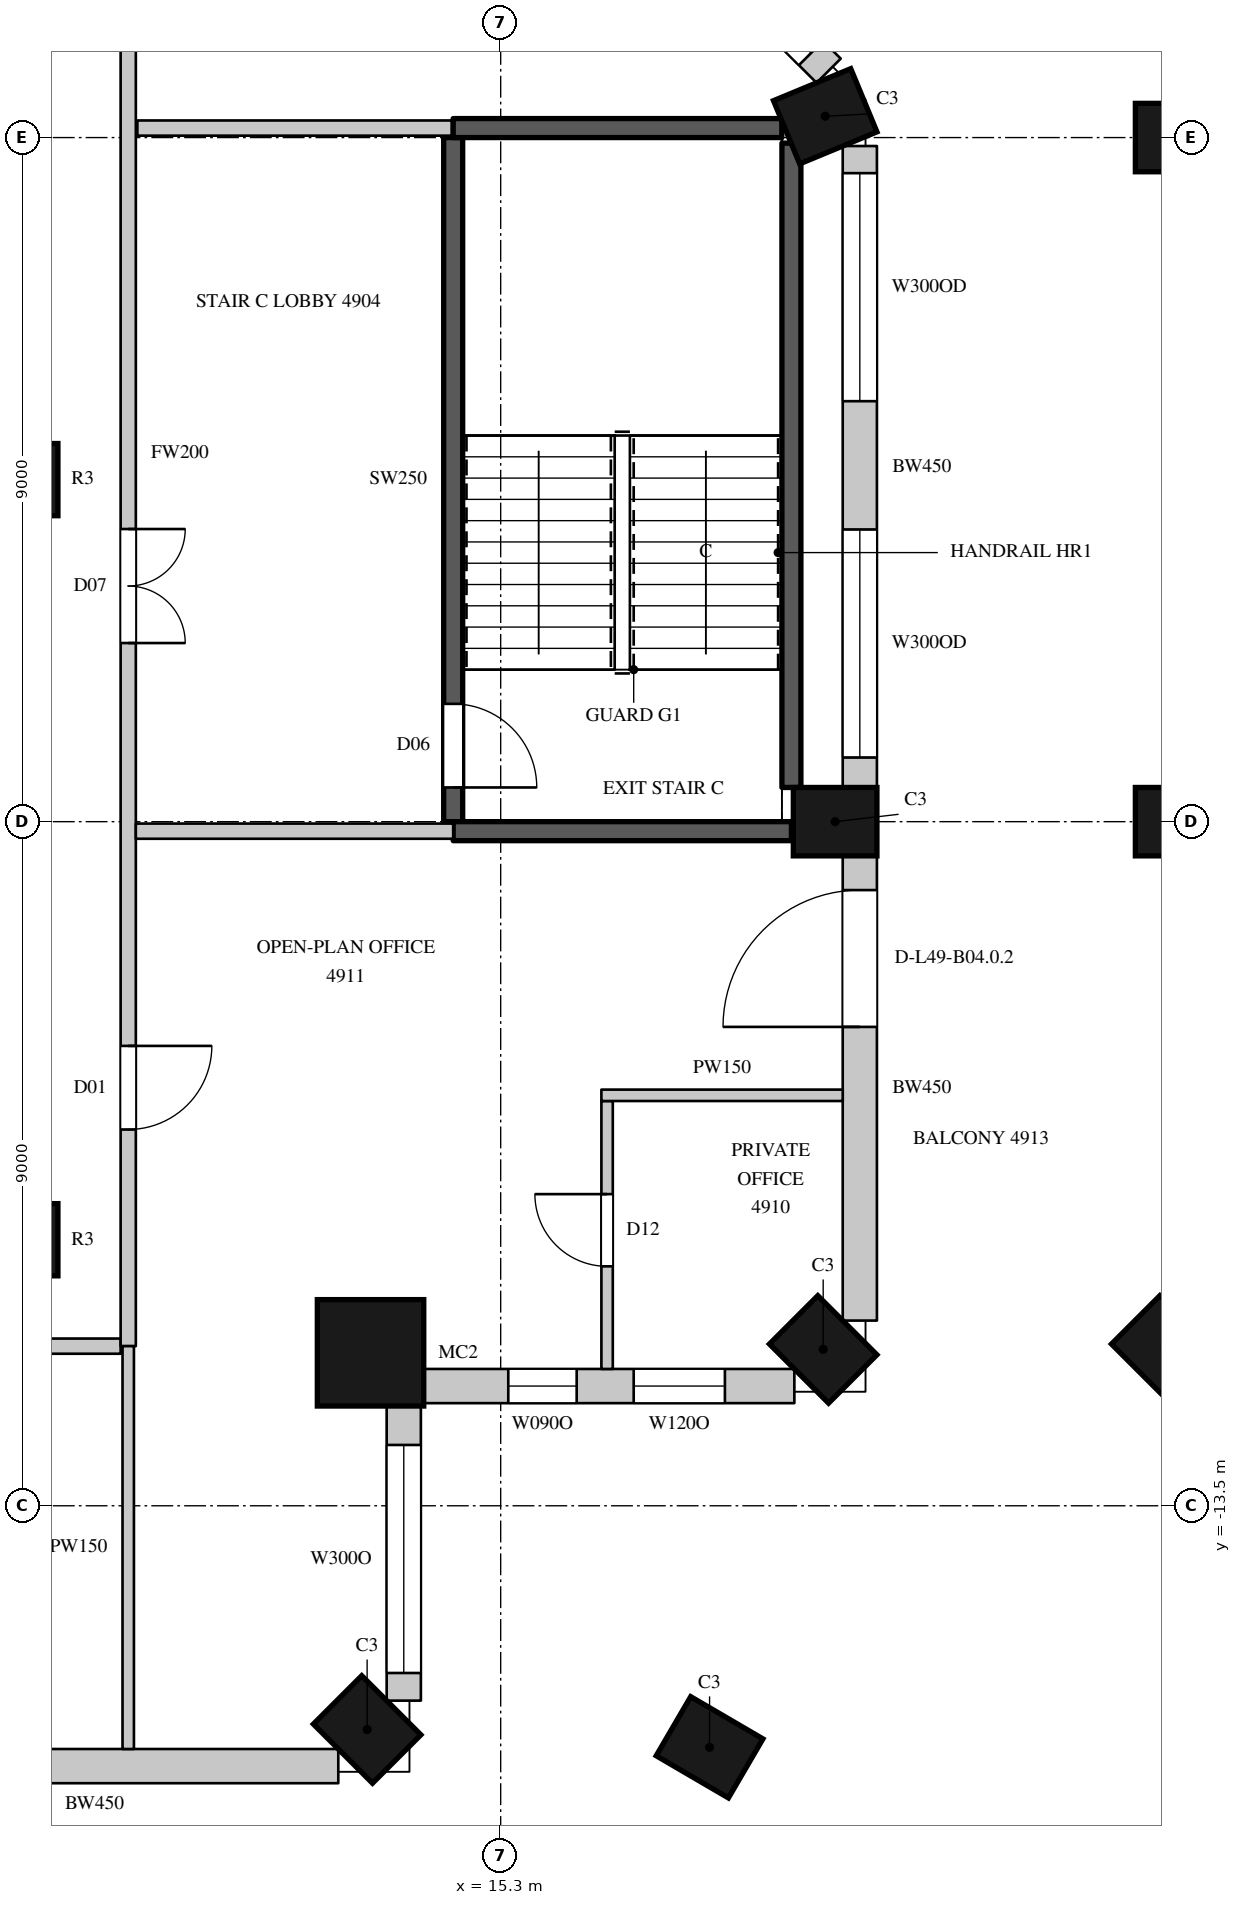
"""IFC4 building model, lengths in metres.
Left out: names, types, materials, properties, quantities, classifications, styles, units other than length and angle.
Written with IfcOpenShell. Run it as: python <this file> out.ifc"""

import sys

from ifc_helpers import new_model, si_unit, direction, frame, frame_2d, origin, origin_2d, place, context, subcontext, project, spatial, rectangle, circle, extrude, element, fill, save


model = new_model("IFC4")
c1 = context("Model", 3, precision=1e-05, world=origin(), true_north=direction((0.0, 1.0)))
c2 = subcontext(c1, "Body", "Model", "MODEL_VIEW")
j1 = project(units=[si_unit("LENGTHUNIT", "METRE"), si_unit("PLANEANGLEUNIT", "RADIAN")], contexts=[c1])
p1 = place(None, origin())
s1 = spatial("IfcSite", under=j1, at=p1, CompositionType="ELEMENT")
p2 = place(p1, origin())
s2 = spatial("IfcBuilding", under=s1, at=p2, CompositionType="ELEMENT")
p3 = place(p2, frame((0.0, 0.0, 222.0)))
s3 = spatial("IfcBuildingStorey", under=s2, at=p3, CompositionType="ELEMENT", Elevation=222.0)
p4 = place(p3, frame((13.543, -16.443, 0.0), z_axis=(0.0, 0.0, 1.0), x_axis=(0.707106781187, 0.707106781187, 0.0)))
e1 = element("IfcColumn", 1, at=p4, inside=s3, PredefinedType="COLUMN", context=c2, shape_type="SweptSolid", body=[
    extrude(rectangle(XDim=0.9, YDim=1.1, at=origin_2d()), origin(), (0.0, 0.0, 1.0), 4.1),
])
p5 = place(p3, frame((13.588, -11.488, 0.0), z_axis=(0.0, 0.0, 1.0), x_axis=(1.0, 0.0, 0.0)))
e2 = element("IfcColumn", 2, at=p5, inside=s3, PredefinedType="COLUMN", context=c2, shape_type="SweptSolid", body=[
    extrude(circle(Radius=0.7, at=origin_2d()), origin(), (0.0, 0.0, 1.0), 4.1),
])
for number, where, z_axis, x_axis in (
    (3, (19.543, -11.443, 0.0), (0.0, 0.0, 1.0), (0.707, 0.707, 0.0)),
    (4, (19.7, -4.5, 0.0), (0.0, 0.0, 1.0), (0.0, 1.0, 0.0)),
    (5, (19.57, 4.78, 0.0), (0.0, 0.0, 1.0), (-0.383, 0.924, 0.0)),
    (6, (18.048, -16.677, 0.0), (0.0, 0.0, 1.0), (0.504, 0.863, 0.0)),
    (7, (24.043, -11.443, 0.0), (0.0, 0.0, 1.0), (0.707, 0.707, 0.0)),
    (8, (24.2, -4.5, 0.0), (0.0, 0.0, 1.0), (0.0, 1.0, 0.0)),
    (9, (24.2, 4.5, 0.0), (0.0, 0.0, 1.0), (0.0, 1.0, 0.0)),
):
    element("IfcColumn", number, at=place(p3, frame(where, z_axis=z_axis, x_axis=x_axis)), inside=s3, PredefinedType="COLUMN", context=c2, shape_type="SweptSolid", body=[
        extrude(rectangle(XDim=0.9, YDim=1.1, at=origin_2d()), origin(), (0.0, 0.0, 1.0), 4.1),
    ])
for number, where, z_axis, x_axis in (
    (10, (9.0, -10.0, 0.0), (0.0, 0.0, 1.0), (1.0, 0.0, 0.0)),
    (11, (9.0, 0.0, 0.0), (0.0, 0.0, 1.0), (1.0, 0.0, 0.0)),
):
    element("IfcColumn", number, at=place(p3, frame(where, z_axis=z_axis, x_axis=x_axis)), inside=s3, PredefinedType="COLUMN", context=c2, shape_type="SweptSolid", body=[
        extrude(circle(Radius=0.475, at=origin_2d()), origin(), (0.0, 0.0, 1.0), 4.1),
    ])
p6 = place(p3, frame((6.75, -16.925, 0.0), z_axis=(0.0, 0.0, 1.0), x_axis=(1.0, 0.0, 0.0)))
e12 = element("IfcWall", 12, at=p6, inside=s3, PredefinedType="SOLIDWALL", context=c2, shape_type="SweptSolid", body=[
    extrude(rectangle(XDim=6.414, YDim=0.45, at=frame_2d((3.207, 0.0))), origin(), (0.0, 0.0, 1.0), 3.8),
])
p7 = place(p6, frame((0.525, 0.0, 0.0)))
e13 = element("IfcOpeningElement", 13, at=p7, cuts=e12, PredefinedType="OPENING", context=c2, shape_type="SweptSolid", body=[
    extrude(rectangle(XDim=1.8, YDim=2.4, at=frame_2d((0.9, 1.2))), frame((0.0, 0.235, 0.0), z_axis=(0.0, -1.0, 0.0), x_axis=(1.0, 0.0, 0.0)), (0.0, 0.0, 1.0), 0.47),
])
p8 = place(p3, frame((14.025, -16.064, 0.0), z_axis=(0.0, 0.0, 1.0), x_axis=(0.0, 1.0, 0.0)))
e14 = element("IfcWall", 14, at=p8, inside=s3, PredefinedType="SOLIDWALL", context=c2, shape_type="SweptSolid", body=[
    extrude(rectangle(XDim=3.909, YDim=0.45, at=frame_2d((1.955, 0.0))), origin(), (0.0, 0.0, 1.0), 3.8),
])
p9 = place(p8, frame((0.364, 0.0, 1.05)))
e15 = element("IfcOpeningElement", 15, at=p9, cuts=e14, PredefinedType="OPENING", context=c2, shape_type="SweptSolid", body=[
    extrude(rectangle(XDim=3.0, YDim=2.4, at=frame_2d((1.5, 1.2))), frame((0.0, 0.235, 0.0), z_axis=(0.0, -1.0, 0.0), x_axis=(1.0, 0.0, 0.0)), (0.0, 0.0, 1.0), 0.47),
])
p10 = place(p3, frame((14.255, -11.925, 0.0), z_axis=(0.0, 0.0, 1.0), x_axis=(1.0, 0.0, 0.0)))
e16 = element("IfcWall", 16, at=p10, inside=s3, PredefinedType="SOLIDWALL", context=c2, shape_type="SweptSolid", body=[
    extrude(rectangle(XDim=4.909, YDim=0.45, at=frame_2d((2.455, 0.0))), origin(), (0.0, 0.0, 1.0), 3.8),
])
p11 = place(p10, frame((1.146, 0.0, 1.05)))
e17 = element("IfcOpeningElement", 17, at=p11, cuts=e16, PredefinedType="OPENING", context=c2, shape_type="SweptSolid", body=[
    extrude(rectangle(XDim=0.9, YDim=2.4, at=frame_2d((0.45, 1.2))), frame((0.0, 0.235, 0.0), z_axis=(0.0, -1.0, 0.0), x_axis=(1.0, 0.0, 0.0)), (0.0, 0.0, 1.0), 0.47),
])
p12 = place(p10, frame((2.795, 0.0, 1.05)))
e18 = element("IfcOpeningElement", 18, at=p12, cuts=e16, PredefinedType="OPENING", context=c2, shape_type="SweptSolid", body=[
    extrude(rectangle(XDim=1.2, YDim=2.4, at=frame_2d((0.6, 1.2))), frame((0.0, 0.235, 0.0), z_axis=(0.0, -1.0, 0.0), x_axis=(1.0, 0.0, 0.0)), (0.0, 0.0, 1.0), 0.47),
])
p13 = place(p3, frame((20.025, -11.064, 0.0), z_axis=(0.0, 0.0, 1.0), x_axis=(0.0, 1.0, 0.0)))
e19 = element("IfcWall", 19, at=p13, inside=s3, PredefinedType="SOLIDWALL", context=c2, shape_type="SweptSolid", body=[
    extrude(rectangle(XDim=6.114, YDim=0.45, at=frame_2d((3.057, 0.0))), origin(), (0.0, 0.0, 1.0), 3.8),
])
p14 = place(p13, frame((3.864, 0.0, 0.0)))
e20 = element("IfcOpeningElement", 20, at=p14, cuts=e19, PredefinedType="OPENING", context=c2, shape_type="SweptSolid", body=[
    extrude(rectangle(XDim=1.8, YDim=2.4, at=frame_2d((0.9, 1.2))), frame((0.0, 0.235, 0.0), z_axis=(0.0, -1.0, 0.0), x_axis=(1.0, 0.0, 0.0)), (0.0, 0.0, 1.0), 0.47),
])
p15 = place(p3, frame((20.025, -4.05, 0.0), z_axis=(0.0, 0.0, 1.0), x_axis=(0.0, 1.0, 0.0)))
e21 = element("IfcWall", 21, at=p15, inside=s3, PredefinedType="SOLIDWALL", context=c2, shape_type="SweptSolid", body=[
    extrude(rectangle(XDim=8.439, YDim=0.45, at=frame_2d((4.219, 0.0))), origin(), (0.0, 0.0, 1.0), 3.8),
])
p16 = place(p15, frame((0.394, 0.0, 1.05)))
e22 = element("IfcOpeningElement", 22, at=p16, cuts=e21, PredefinedType="OPENING", context=c2, shape_type="SweptSolid", body=[
    extrude(rectangle(XDim=3.0, YDim=2.4, at=frame_2d((1.5, 1.2))), frame((0.0, 0.235, 0.0), z_axis=(0.0, -1.0, 0.0), x_axis=(1.0, 0.0, 0.0)), (0.0, 0.0, 1.0), 0.47),
])
p17 = place(p15, frame((5.082, 0.0, 1.05)))
e23 = element("IfcOpeningElement", 23, at=p17, cuts=e21, PredefinedType="OPENING", context=c2, shape_type="SweptSolid", body=[
    extrude(rectangle(XDim=3.0, YDim=2.4, at=frame_2d((1.5, 1.2))), frame((0.0, 0.235, 0.0), z_axis=(0.0, -1.0, 0.0), x_axis=(1.0, 0.0, 0.0)), (0.0, 0.0, 1.0), 0.47),
])
p18 = place(p3, frame((19.615, 5.379, 0.0), z_axis=(0.0, 0.0, 1.0), x_axis=(-0.707089646058, 0.7071239159, 0.0)))
e24 = element("IfcWall", 24, at=p18, inside=s3, PredefinedType="SOLIDWALL", context=c2, shape_type="SweptSolid", body=[
    extrude(rectangle(XDim=7.124, YDim=0.45, at=frame_2d((3.562, 0.0))), origin(), (0.0, 0.0, 1.0), 3.8),
])
p19 = place(p18, frame((0.328, 0.0, 1.05)))
e25 = element("IfcOpeningElement", 25, at=p19, cuts=e24, PredefinedType="OPENING", context=c2, shape_type="SweptSolid", body=[
    extrude(rectangle(XDim=2.4, YDim=2.4, at=frame_2d((1.2, 1.2))), frame((0.0, 0.235, 0.0), z_axis=(0.0, -1.0, 0.0), x_axis=(1.0, 0.0, 0.0)), (0.0, 0.0, 1.0), 0.47),
])
p20 = place(p18, frame((4.359, 0.0, 1.05)))
e26 = element("IfcOpeningElement", 26, at=p20, cuts=e24, PredefinedType="OPENING", context=c2, shape_type="SweptSolid", body=[
    extrude(rectangle(XDim=2.4, YDim=2.4, at=frame_2d((1.2, 1.2))), frame((0.0, 0.235, 0.0), z_axis=(0.0, -1.0, 0.0), x_axis=(1.0, 0.0, 0.0)), (0.0, 0.0, 1.0), 0.47),
])
p21 = place(p3, frame((-10.9, -11.4, 0.0), z_axis=(0.0, 0.0, 1.0), x_axis=(1.0, 0.0, 0.0)))
e27 = element("IfcWall", 27, at=p21, inside=s3, PredefinedType="PARTITIONING", context=c2, shape_type="SweptSolid", body=[
    extrude(rectangle(XDim=21.2, YDim=0.2, at=frame_2d((10.6, 0.0))), origin(), (0.0, 0.0, 1.0), 3.8),
])
p22 = place(p21, frame((0.95, 0.0, 0.0)))
e28 = element("IfcOpeningElement", 28, at=p22, cuts=e27, PredefinedType="OPENING", context=c2, shape_type="SweptSolid", body=[
    extrude(rectangle(XDim=0.95, YDim=2.2, at=frame_2d((0.475, 1.1))), frame((0.0, 0.11, 0.0), z_axis=(0.0, -1.0, 0.0), x_axis=(1.0, 0.0, 0.0)), (0.0, 0.0, 1.0), 0.22),
])
p23 = place(p21, frame((4.2, 0.0, 0.0)))
e29 = element("IfcOpeningElement", 29, at=p23, cuts=e27, PredefinedType="OPENING", context=c2, shape_type="SweptSolid", body=[
    extrude(rectangle(XDim=0.9, YDim=2.2, at=frame_2d((0.45, 1.1))), frame((0.0, 0.11, 0.0), z_axis=(0.0, -1.0, 0.0), x_axis=(1.0, 0.0, 0.0)), (0.0, 0.0, 1.0), 0.22),
])
p24 = place(p21, frame((8.35, 0.0, 0.0)))
e30 = element("IfcOpeningElement", 30, at=p24, cuts=e27, PredefinedType="OPENING", context=c2, shape_type="SweptSolid", body=[
    extrude(rectangle(XDim=1.1, YDim=2.4, at=frame_2d((0.55, 1.2))), frame((0.0, 0.11, 0.0), z_axis=(0.0, -1.0, 0.0), x_axis=(1.0, 0.0, 0.0)), (0.0, 0.0, 1.0), 0.22),
])
p25 = place(p21, frame((18.0, 0.0, 0.0)))
e31 = element("IfcOpeningElement", 31, at=p25, cuts=e27, PredefinedType="OPENING", context=c2, shape_type="SweptSolid", body=[
    extrude(rectangle(XDim=1.1, YDim=2.4, at=frame_2d((0.55, 1.2))), frame((0.0, 0.11, 0.0), z_axis=(0.0, -1.0, 0.0), x_axis=(1.0, 0.0, 0.0)), (0.0, 0.0, 1.0), 0.22),
])
p26 = place(p3, frame((10.4, -11.4, 0.0), z_axis=(0.0, 0.0, 1.0), x_axis=(0.0, 1.0, 0.0)))
e32 = element("IfcWall", 32, at=p26, inside=s3, PredefinedType="PARTITIONING", context=c2, shape_type="SweptSolid", body=[
    extrude(rectangle(XDim=23.5, YDim=0.2, at=frame_2d((11.75, 0.0))), origin(), (0.0, 0.0, 1.0), 3.8),
])
p27 = place(p26, frame((9.25, 0.0, 0.0)))
e33 = element("IfcOpeningElement", 33, at=p27, cuts=e32, PredefinedType="OPENING", context=c2, shape_type="SweptSolid", body=[
    extrude(rectangle(XDim=1.5, YDim=2.4, at=frame_2d((0.75, 1.2))), frame((0.0, 0.11, 0.0), z_axis=(0.0, -1.0, 0.0), x_axis=(1.0, 0.0, 0.0)), (0.0, 0.0, 1.0), 0.22),
])
p28 = place(p26, frame((2.85, 0.0, 0.0)))
e34 = element("IfcOpeningElement", 34, at=p28, cuts=e32, PredefinedType="OPENING", context=c2, shape_type="SweptSolid", body=[
    extrude(rectangle(XDim=1.1, YDim=2.4, at=frame_2d((0.55, 1.2))), frame((0.0, 0.11, 0.0), z_axis=(0.0, -1.0, 0.0), x_axis=(1.0, 0.0, 0.0)), (0.0, 0.0, 1.0), 0.22),
])
p29 = place(p3, frame((10.5, -4.625, 0.0), z_axis=(0.0, 0.0, 1.0), x_axis=(1.0, 0.0, 0.0)))
e35 = element("IfcWall", 35, at=p29, inside=s3, PredefinedType="PARTITIONING", context=c2, shape_type="SweptSolid", body=[
    extrude(rectangle(XDim=4.175, YDim=0.2, at=frame_2d((2.087, 0.0))), origin(), (0.0, 0.0, 1.0), 3.8),
])
p30 = place(p3, frame((10.52, 4.625, 0.0), z_axis=(0.0, 0.0, 1.0), x_axis=(1.0, 0.0, 0.0)))
e36 = element("IfcWall", 36, at=p30, inside=s3, PredefinedType="PARTITIONING", context=c2, shape_type="SweptSolid", body=[
    extrude(rectangle(XDim=4.135, YDim=0.2, at=frame_2d((2.067, 0.0))), origin(), (0.0, 0.0, 1.0), 3.8),
])
p31 = place(p3, frame((10.4, -16.7, 0.0), z_axis=(0.0, 0.0, 1.0), x_axis=(0.0, 1.0, 0.0)))
e37 = element("IfcWall", 37, at=p31, inside=s3, PredefinedType="PARTITIONING", context=c2, shape_type="SweptSolid", body=[
    extrude(rectangle(XDim=5.3, YDim=0.15, at=frame_2d((2.65, 0.0))), origin(), (0.0, 0.0, 1.0), 3.8),
])
p32 = place(p3, frame((16.7, -11.7, 0.0), z_axis=(0.0, 0.0, 1.0), x_axis=(0.0, 1.0, 0.0)))
e38 = element("IfcWall", 38, at=p32, inside=s3, PredefinedType="PARTITIONING", context=c2, shape_type="SweptSolid", body=[
    extrude(rectangle(XDim=3.525, YDim=0.15, at=frame_2d((1.762, 0.0))), origin(), (0.0, 0.0, 1.0), 3.8),
])
p33 = place(p32, frame((1.35, 0.0, 0.0)))
e39 = element("IfcOpeningElement", 39, at=p33, cuts=e38, PredefinedType="OPENING", context=c2, shape_type="SweptSolid", body=[
    extrude(rectangle(XDim=0.95, YDim=2.2, at=frame_2d((0.475, 1.1))), frame((0.0, 0.085, 0.0), z_axis=(0.0, -1.0, 0.0), x_axis=(1.0, 0.0, 0.0)), (0.0, 0.0, 1.0), 0.17),
])
p34 = place(p3, frame((16.625, -8.1, 0.0), z_axis=(0.0, 0.0, 1.0), x_axis=(1.0, 0.0, 0.0)))
e40 = element("IfcWall", 40, at=p34, inside=s3, PredefinedType="PARTITIONING", context=c2, shape_type="SweptSolid", body=[
    extrude(rectangle(XDim=3.175, YDim=0.15, at=frame_2d((1.587, 0.0))), origin(), (0.0, 0.0, 1.0), 3.15),
])
p35 = place(p3, frame((14.675, -4.5, 0.0), z_axis=(0.0, 0.0, 1.0), x_axis=(0.0, 1.0, 0.0)))
e41 = element("IfcWall", 41, at=p35, inside=s3, PredefinedType="SHEAR", context=c2, shape_type="SweptSolid", body=[
    extrude(rectangle(XDim=9.0, YDim=0.25, at=frame_2d((4.5, 0.0))), origin(), (0.0, 0.0, 1.0), 3.8),
])
p36 = place(p35, frame((0.45, 0.0, 0.0)))
e42 = element("IfcOpeningElement", 42, at=p36, cuts=e41, PredefinedType="OPENING", context=c2, shape_type="SweptSolid", body=[
    extrude(rectangle(XDim=1.1, YDim=2.2, at=frame_2d((0.55, 1.1))), frame((0.0, 0.135, 0.0), z_axis=(0.0, -1.0, 0.0), x_axis=(1.0, 0.0, 0.0)), (0.0, 0.0, 1.0), 0.27),
])
p37 = place(p3, frame((14.675, -4.625, 0.0), z_axis=(0.0, 0.0, 1.0), x_axis=(1.0, 0.0, 0.0)))
e43 = element("IfcWall", 43, at=p37, inside=s3, PredefinedType="SHEAR", context=c2, shape_type="SweptSolid", body=[
    extrude(rectangle(XDim=4.45, YDim=0.25, at=frame_2d((2.225, 0.0))), origin(), (0.0, 0.0, 1.0), 3.8),
])
p38 = place(p3, frame((14.675, 4.625, 0.0), z_axis=(0.0, 0.0, 1.0), x_axis=(1.0, 0.0, 0.0)))
e44 = element("IfcWall", 44, at=p38, inside=s3, PredefinedType="SHEAR", context=c2, shape_type="SweptSolid", body=[
    extrude(rectangle(XDim=4.324, YDim=0.25, at=frame_2d((2.162, 0.0))), origin(), (0.0, 0.0, 1.0), 3.8),
])
p39 = place(p3, frame((19.125, -4.05, 0.0), z_axis=(0.0, 0.0, 1.0), x_axis=(0.0, 1.0, 0.0)))
e45 = element("IfcWall", 45, at=p39, inside=s3, PredefinedType="SHEAR", context=c2, shape_type="SweptSolid", body=[
    extrude(rectangle(XDim=8.477, YDim=0.25, at=frame_2d((4.238, 0.0))), origin(), (0.0, 0.0, 1.0), 3.8),
])
p40 = place(p9, origin())
e46 = element("IfcWindow", 46, at=p40, inside=s3, PartitioningType="SINGLE_PANEL", PredefinedType="WINDOW", context=c2, shape_type="SweptSolid", body=[
    extrude(rectangle(XDim=3.0, YDim=2.4, at=frame_2d((1.5, 1.2))), frame((0.0, 0.135, 0.0), z_axis=(0.0, -1.0, 0.0), x_axis=(1.0, 0.0, 0.0)), (0.0, 0.0, 1.0), 0.06),
])
fill(e15, e46)
p41 = place(p14, origin())
e47 = element("IfcDoor", 47, at=p41, inside=s3, OperationType="SLIDING_TO_LEFT", PredefinedType="DOOR", context=c2, shape_type="SweptSolid", body=[
    extrude(rectangle(XDim=1.8, YDim=2.4, at=frame_2d((0.9, 1.2))), frame((0.0, 0.13, 0.0), z_axis=(0.0, -1.0, 0.0), x_axis=(1.0, 0.0, 0.0)), (0.0, 0.0, 1.0), 0.05),
])
fill(e20, e47)
p42 = place(p16, origin())
e48 = element("IfcWindow", 48, at=p42, inside=s3, PartitioningType="SINGLE_PANEL", PredefinedType="WINDOW", context=c2, shape_type="SweptSolid", body=[
    extrude(rectangle(XDim=3.0, YDim=2.4, at=frame_2d((1.5, 1.2))), frame((0.0, 0.135, 0.0), z_axis=(0.0, -1.0, 0.0), x_axis=(1.0, 0.0, 0.0)), (0.0, 0.0, 1.0), 0.06),
])
fill(e22, e48)
p43 = place(p17, origin())
e49 = element("IfcWindow", 49, at=p43, inside=s3, PartitioningType="SINGLE_PANEL", PredefinedType="WINDOW", context=c2, shape_type="SweptSolid", body=[
    extrude(rectangle(XDim=3.0, YDim=2.4, at=frame_2d((1.5, 1.2))), frame((0.0, 0.135, 0.0), z_axis=(0.0, -1.0, 0.0), x_axis=(1.0, 0.0, 0.0)), (0.0, 0.0, 1.0), 0.06),
])
fill(e23, e49)
p44 = place(p19, origin())
e50 = element("IfcWindow", 50, at=p44, inside=s3, PartitioningType="SINGLE_PANEL", PredefinedType="WINDOW", context=c2, shape_type="SweptSolid", body=[
    extrude(rectangle(XDim=2.4, YDim=2.4, at=frame_2d((1.2, 1.2))), frame((0.0, 0.135, 0.0), z_axis=(0.0, -1.0, 0.0), x_axis=(1.0, 0.0, 0.0)), (0.0, 0.0, 1.0), 0.06),
])
fill(e25, e50)
p45 = place(p27, origin())
e51 = element("IfcDoor", 51, at=p45, inside=s3, OperationType="DOUBLE_DOOR_SINGLE_SWING", PredefinedType="DOOR", context=c2, shape_type="SweptSolid", body=[
    extrude(rectangle(XDim=1.5, YDim=2.4, at=frame_2d((0.75, 1.2))), frame((0.0, 0.025, 0.0), z_axis=(0.0, -1.0, 0.0), x_axis=(1.0, 0.0, 0.0)), (0.0, 0.0, 1.0), 0.05),
])
fill(e33, e51)
p46 = place(p28, origin())
e52 = element("IfcDoor", 52, at=p46, inside=s3, OperationType="SINGLE_SWING_LEFT", PredefinedType="DOOR", context=c2, shape_type="SweptSolid", body=[
    extrude(rectangle(XDim=1.1, YDim=2.4, at=frame_2d((0.55, 1.2))), frame((0.0, 0.025, 0.0), z_axis=(0.0, -1.0, 0.0), x_axis=(1.0, 0.0, 0.0)), (0.0, 0.0, 1.0), 0.05),
])
fill(e34, e52)
p47 = place(p33, origin())
e53 = element("IfcDoor", 53, at=p47, inside=s3, OperationType="SINGLE_SWING_RIGHT", PredefinedType="DOOR", context=c2, shape_type="SweptSolid", body=[
    extrude(rectangle(XDim=0.95, YDim=2.2, at=frame_2d((0.475, 1.1))), frame((0.0, 0.025, 0.0), z_axis=(0.0, -1.0, 0.0), x_axis=(1.0, 0.0, 0.0)), (0.0, 0.0, 1.0), 0.05),
])
fill(e39, e53)
p48 = place(p36, origin())
e54 = element("IfcDoor", 54, at=p48, inside=s3, OperationType="SINGLE_SWING_RIGHT", PredefinedType="DOOR", context=c2, shape_type="SweptSolid", body=[
    extrude(rectangle(XDim=1.1, YDim=2.2, at=frame_2d((0.55, 1.1))), frame((0.0, 0.025, 0.0), z_axis=(0.0, -1.0, 0.0), x_axis=(1.0, 0.0, 0.0)), (0.0, 0.0, 1.0), 0.05),
])
fill(e42, e54)
p49 = place(p11, origin())
e55 = element("IfcWindow", 55, at=p49, inside=s3, PartitioningType="SINGLE_PANEL", PredefinedType="WINDOW", context=c2, shape_type="SweptSolid", body=[
    extrude(rectangle(XDim=0.9, YDim=2.4, at=frame_2d((0.45, 1.2))), frame((0.0, 0.135, 0.0), z_axis=(0.0, -1.0, 0.0), x_axis=(1.0, 0.0, 0.0)), (0.0, 0.0, 1.0), 0.06),
])
fill(e17, e55)
p50 = place(p12, origin())
e56 = element("IfcWindow", 56, at=p50, inside=s3, PartitioningType="SINGLE_PANEL", PredefinedType="WINDOW", context=c2, shape_type="SweptSolid", body=[
    extrude(rectangle(XDim=1.2, YDim=2.4, at=frame_2d((0.6, 1.2))), frame((0.0, 0.135, 0.0), z_axis=(0.0, -1.0, 0.0), x_axis=(1.0, 0.0, 0.0)), (0.0, 0.0, 1.0), 0.06),
])
fill(e18, e56)
save(model, sys.argv[1])
